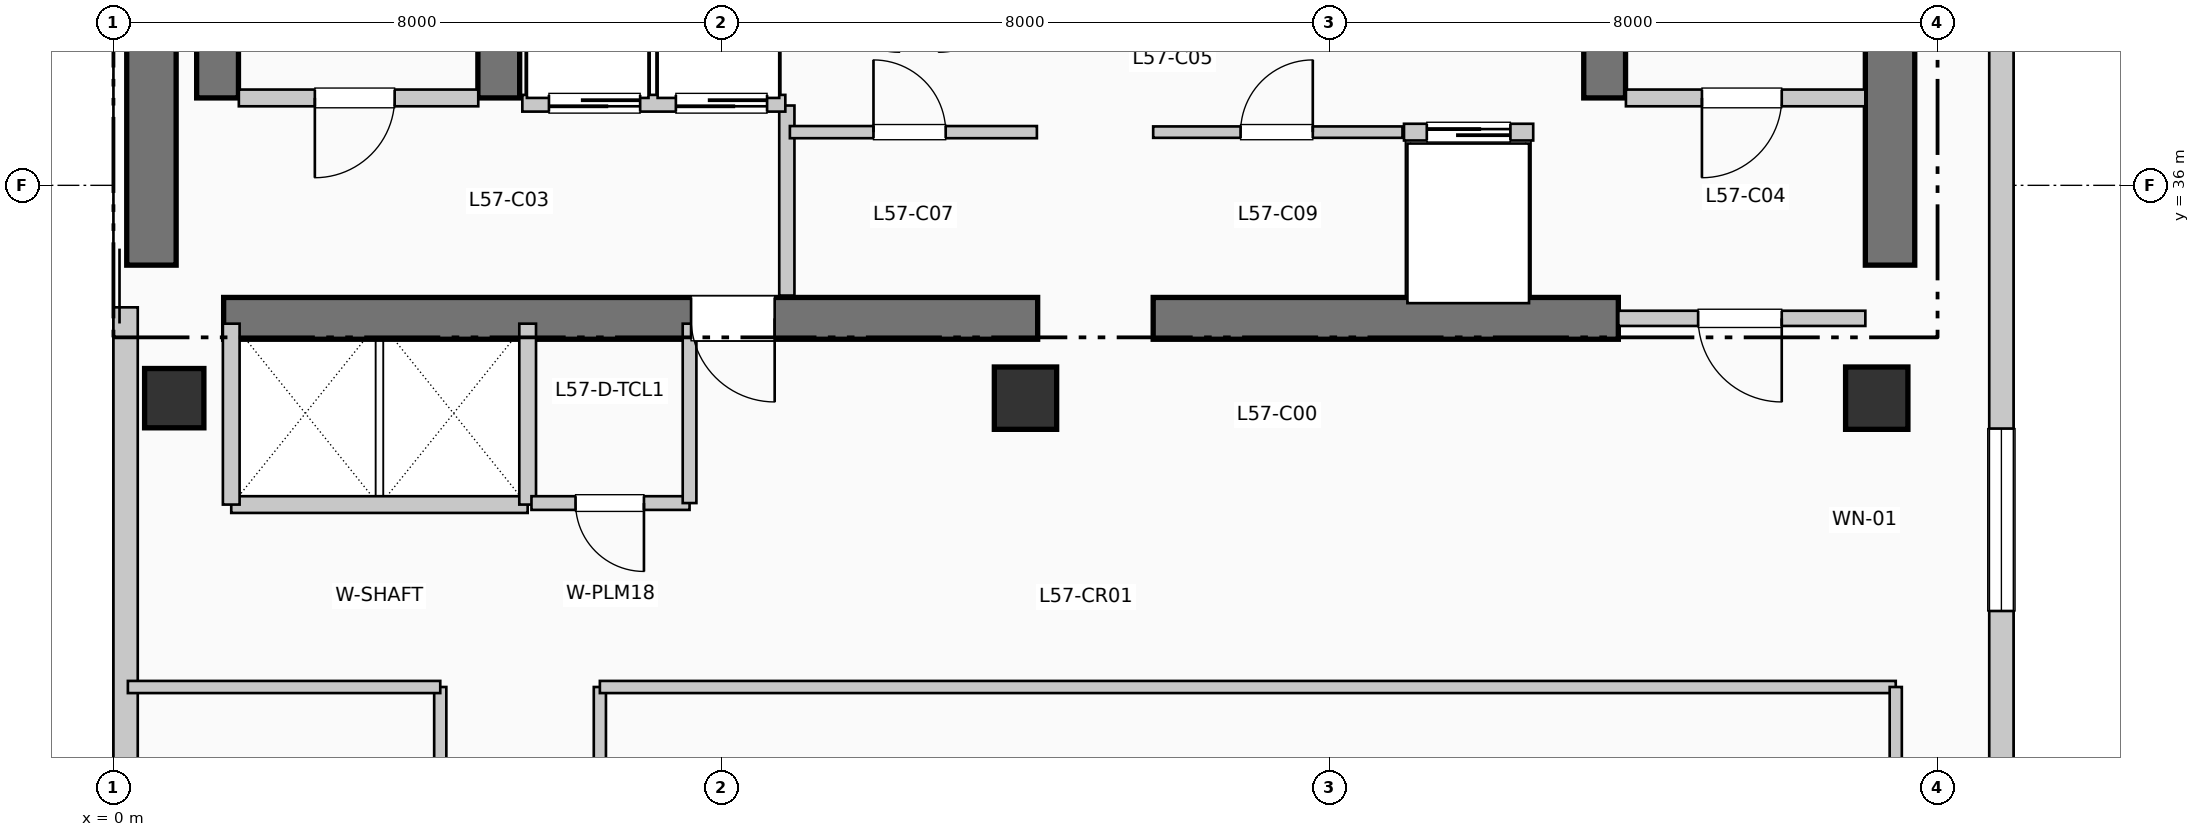
"""IFC4 building model, lengths in metres.
Left out: names, types, materials, properties, quantities, classifications, styles, units other than length and angle.
Written with IfcOpenShell. Run it as: python <this file> out.ifc"""

import sys

from ifc_helpers import new_model, si_unit, direction, frame, frame_2d, origin, origin_2d, place, context, subcontext, project, spatial, rectangle, extrude, element, fill, save


model = new_model("IFC4")
c1 = context("Model", 3, precision=1e-05, world=origin(), true_north=direction((0.0, 1.0)))
c2 = subcontext(c1, "Body", "Model", "MODEL_VIEW")
j1 = project(units=[si_unit("LENGTHUNIT", "METRE"), si_unit("PLANEANGLEUNIT", "RADIAN")], contexts=[c1])
p1 = place(None, origin())
s1 = spatial("IfcSite", under=j1, at=p1, CompositionType="ELEMENT")
p2 = place(p1, origin())
s2 = spatial("IfcBuilding", under=s1, at=p2, CompositionType="ELEMENT")
p3 = place(p2, frame((0.0, 0.0, 235.62)))
s3 = spatial("IfcBuildingStorey", under=s2, at=p3, CompositionType="ELEMENT", Elevation=235.62)
p4 = place(p3, frame((0.5, 34.95, 0.0), z_axis=(0.0, 0.0, 1.0), x_axis=(0.0, 1.0, 0.0)))
e1 = element("IfcWall", 1, at=p4, inside=s3, PredefinedType="SHEAR", context=c2, shape_type="SweptSolid", body=[
    extrude(rectangle(XDim=7.9, YDim=0.65, at=frame_2d((3.95, 0.0))), origin(), (0.0, 0.0, 1.0), 3.96),
])
p5 = place(p3, frame((23.375, 34.95, 0.0), z_axis=(0.0, 0.0, 1.0), x_axis=(0.0, 1.0, 0.0)))
e2 = element("IfcWall", 2, at=p5, inside=s3, PredefinedType="SHEAR", context=c2, shape_type="SweptSolid", body=[
    extrude(rectangle(XDim=10.64, YDim=0.65, at=frame_2d((5.32, 0.0))), origin(), (0.0, 0.0, 1.0), 3.96),
])
p6 = place(p3, frame((1.45, 34.25, 0.0), z_axis=(0.0, 0.0, 1.0), x_axis=(1.0, 0.0, 0.0)))
e3 = element("IfcWall", 3, at=p6, inside=s3, PredefinedType="SHEAR", context=c2, shape_type="SweptSolid", body=[
    extrude(rectangle(XDim=10.71, YDim=0.55, at=frame_2d((5.355, 0.0))), origin(), (0.0, 0.0, 1.0), 3.96),
])
p7 = place(p6, frame((7.25, 0.0, 0.0), z_axis=(0.0, 0.0, 1.0), x_axis=(-1.0, 0.0, 0.0)))
e4 = element("IfcOpeningElement", 4, at=p7, cuts=e3, PredefinedType="OPENING", context=c2, shape_type="SweptSolid", body=[
    extrude(rectangle(XDim=1.1, YDim=2.15, at=frame_2d((0.55, 1.075))), frame((0.0, 0.285, 0.0), z_axis=(0.0, -1.0, 0.0), x_axis=(1.0, 0.0, 0.0)), (0.0, 0.0, 1.0), 0.57),
])
p8 = place(p3, frame((13.68, 34.25, 0.0), z_axis=(0.0, 0.0, 1.0), x_axis=(1.0, 0.0, 0.0)))
e5 = element("IfcWall", 5, at=p8, inside=s3, PredefinedType="SHEAR", context=c2, shape_type="SweptSolid", body=[
    extrude(rectangle(XDim=6.12, YDim=0.55, at=frame_2d((3.06, 0.0))), origin(), (0.0, 0.0, 1.0), 3.96),
])
for number, where, z_axis, x_axis in (
    (6, (1.37, 37.15, 0.0), (0.0, 0.0, 1.0), (0.0, 1.0, 0.0)),
    (7, (5.07, 37.15, 0.0), (0.0, 0.0, 1.0), (0.0, 1.0, 0.0)),
    (8, (19.62, 37.15, 0.0), (0.0, 0.0, 1.0), (0.0, 1.0, 0.0)),
):
    element("IfcWall", number, at=place(p3, frame(where, z_axis=z_axis, x_axis=x_axis)), inside=s3, PredefinedType="SHEAR", context=c2, shape_type="SweptSolid", body=[
        extrude(rectangle(XDim=7.89, YDim=0.55, at=frame_2d((3.945, 0.0))), origin(), (0.0, 0.0, 1.0), 3.96),
    ])
p9 = place(p3, frame((0.8, 33.2, 0.0), z_axis=(0.0, 0.0, 1.0), x_axis=(1.0, 0.0, 0.0)))
e9 = element("IfcColumn", 9, at=p9, inside=s3, PredefinedType="COLUMN", context=c2, shape_type="SweptSolid", body=[
    extrude(rectangle(XDim=0.78, YDim=0.78, at=origin_2d()), origin(), (0.0, 0.0, 1.0), 3.96),
])
for number, where, z_axis, x_axis in (
    (10, (12.0, 33.2, 0.0), (0.0, 0.0, 1.0), (1.0, 0.0, 0.0)),
    (11, (23.2, 33.2, 0.0), (0.0, 0.0, 1.0), (1.0, 0.0, 0.0)),
):
    element("IfcColumn", number, at=place(p3, frame(where, z_axis=z_axis, x_axis=x_axis)), inside=s3, PredefinedType="COLUMN", context=c2, shape_type="SweptSolid", body=[
        extrude(rectangle(XDim=0.82, YDim=0.82, at=origin_2d()), origin(), (0.0, 0.0, 1.0), 3.96),
    ])
p10 = place(p3, frame((24.84, 22.055, 0.0), z_axis=(0.0, 0.0, 1.0), x_axis=(0.0, 1.0, 0.0)))
e12 = element("IfcWall", 12, at=p10, inside=s3, PredefinedType="SOLIDWALL", context=c2, shape_type="SweptSolid", body=[
    extrude(rectangle(XDim=19.09, YDim=0.32, at=frame_2d((9.545, 0.0))), origin(), (0.0, 0.0, 1.0), 3.71),
])
p11 = place(p10, frame((8.345, 0.0, 0.85)))
e13 = element("IfcOpeningElement", 13, at=p11, cuts=e12, PredefinedType="OPENING", context=c2, shape_type="SweptSolid", body=[
    extrude(rectangle(XDim=2.4, YDim=2.05, at=frame_2d((1.2, 1.025))), frame((0.0, 0.17, 0.0), z_axis=(0.0, -1.0, 0.0), x_axis=(1.0, 0.0, 0.0)), (0.0, 0.0, 1.0), 0.34),
])
p12 = place(p3, frame((0.16, 34.395, 0.0), z_axis=(0.0, 0.0, 1.0), x_axis=(0.0, -1.0, 0.0)))
e14 = element("IfcWall", 14, at=p12, inside=s3, PredefinedType="SOLIDWALL", context=c2, shape_type="SweptSolid", body=[
    extrude(rectangle(XDim=25.54, YDim=0.32, at=frame_2d((12.77, 0.0))), origin(), (0.0, 0.0, 1.0), 3.71),
])
p13 = place(p3, frame((1.65, 37.15, 0.0), z_axis=(0.0, 0.0, 1.0), x_axis=(1.0, 0.0, 0.0)))
e15 = element("IfcWall", 15, at=p13, inside=s3, PredefinedType="PARTITIONING", context=c2, shape_type="SweptSolid", body=[
    extrude(rectangle(XDim=3.15, YDim=0.22, at=frame_2d((1.575, 0.0))), origin(), (0.0, 0.0, 1.0), 3.71),
])
p14 = place(p13, frame((2.05, 0.0, 0.0), z_axis=(0.0, 0.0, 1.0), x_axis=(-1.0, 0.0, 0.0)))
e16 = element("IfcOpeningElement", 16, at=p14, cuts=e15, PredefinedType="OPENING", context=c2, shape_type="SweptSolid", body=[
    extrude(rectangle(XDim=1.05, YDim=2.15, at=frame_2d((0.525, 1.075))), frame((0.0, 0.12, 0.0), z_axis=(0.0, -1.0, 0.0), x_axis=(1.0, 0.0, 0.0)), (0.0, 0.0, 1.0), 0.24),
])
p15 = place(p3, frame((8.86, 34.55, 0.0), z_axis=(0.0, 0.0, 1.0), x_axis=(0.0, 1.0, 0.0)))
e17 = element("IfcWall", 17, at=p15, inside=s3, PredefinedType="PARTITIONING", context=c2, shape_type="SweptSolid", body=[
    extrude(rectangle(XDim=2.5, YDim=0.2, at=frame_2d((1.25, 0.0))), origin(), (0.0, 0.0, 1.0), 3.71),
])
p16 = place(p3, frame((19.9, 37.15, 0.0), z_axis=(0.0, 0.0, 1.0), x_axis=(1.0, 0.0, 0.0)))
e18 = element("IfcWall", 18, at=p16, inside=s3, PredefinedType="PARTITIONING", context=c2, shape_type="SweptSolid", body=[
    extrude(rectangle(XDim=3.15, YDim=0.22, at=frame_2d((1.575, 0.0))), origin(), (0.0, 0.0, 1.0), 3.71),
])
p17 = place(p16, frame((2.05, 0.0, 0.0), z_axis=(0.0, 0.0, 1.0), x_axis=(-1.0, 0.0, 0.0)))
e19 = element("IfcOpeningElement", 19, at=p17, cuts=e18, PredefinedType="OPENING", context=c2, shape_type="SweptSolid", body=[
    extrude(rectangle(XDim=1.05, YDim=2.15, at=frame_2d((0.525, 1.075))), frame((0.0, 0.12, 0.0), z_axis=(0.0, -1.0, 0.0), x_axis=(1.0, 0.0, 0.0)), (0.0, 0.0, 1.0), 0.24),
])
p18 = place(p3, frame((19.8, 34.25, 0.0), z_axis=(0.0, 0.0, 1.0), x_axis=(1.0, 0.0, 0.0)))
e20 = element("IfcWall", 20, at=p18, inside=s3, PredefinedType="PARTITIONING", context=c2, shape_type="SweptSolid", body=[
    extrude(rectangle(XDim=3.25, YDim=0.2, at=frame_2d((1.625, 0.0))), origin(), (0.0, 0.0, 1.0), 3.71),
])
p19 = place(p18, frame((2.15, 0.0, 0.0), z_axis=(0.0, 0.0, 1.0), x_axis=(-1.0, 0.0, 0.0)))
e21 = element("IfcOpeningElement", 21, at=p19, cuts=e20, PredefinedType="OPENING", context=c2, shape_type="SweptSolid", body=[
    extrude(rectangle(XDim=1.1, YDim=2.15, at=frame_2d((0.55, 1.075))), frame((0.0, 0.11, 0.0), z_axis=(0.0, -1.0, 0.0), x_axis=(1.0, 0.0, 0.0)), (0.0, 0.0, 1.0), 0.22),
])
p20 = place(p3, frame((5.38, 37.08, 0.0), z_axis=(0.0, 0.0, 1.0), x_axis=(1.0, 0.0, 0.0)))
e22 = element("IfcWall", 22, at=p20, inside=s3, PredefinedType="PARTITIONING", context=c2, shape_type="SweptSolid", body=[
    extrude(rectangle(XDim=3.46, YDim=0.22, at=frame_2d((1.73, 0.0))), origin(), (0.0, 0.0, 1.0), 3.71),
])
p21 = place(p20, frame((1.55, 0.0, 0.0), z_axis=(0.0, 0.0, 1.0), x_axis=(-1.0, 0.0, 0.0)))
e23 = element("IfcOpeningElement", 23, at=p21, cuts=e22, PredefinedType="OPENING", context=c2, shape_type="SweptSolid", body=[
    extrude(rectangle(XDim=1.2, YDim=2.2, at=frame_2d((0.6, 1.1))), frame((0.0, 0.12, 0.0), z_axis=(0.0, -1.0, 0.0), x_axis=(1.0, 0.0, 0.0)), (0.0, 0.0, 1.0), 0.24),
])
p22 = place(p20, frame((3.22, 0.0, 0.0), z_axis=(0.0, 0.0, 1.0), x_axis=(-1.0, 0.0, 0.0)))
e24 = element("IfcOpeningElement", 24, at=p22, cuts=e22, PredefinedType="OPENING", context=c2, shape_type="SweptSolid", body=[
    extrude(rectangle(XDim=1.2, YDim=2.2, at=frame_2d((0.6, 1.1))), frame((0.0, 0.12, 0.0), z_axis=(0.0, -1.0, 0.0), x_axis=(1.0, 0.0, 0.0)), (0.0, 0.0, 1.0), 0.24),
])
p23 = place(p3, frame((1.55, 31.8, 0.0), z_axis=(0.0, 0.0, 1.0), x_axis=(1.0, 0.0, 0.0)))
e25 = element("IfcWall", 25, at=p23, inside=s3, PredefinedType="PARTITIONING", context=c2, shape_type="SweptSolid", body=[
    extrude(rectangle(XDim=3.9, YDim=0.22, at=frame_2d((1.95, 0.0))), origin(), (0.0, 0.0, 1.0), 3.71),
])
for number, where, z_axis, x_axis in (
    (26, (1.55, 31.8, 0.0), (0.0, 0.0, 1.0), (0.0, 1.0, 0.0)),
    (27, (5.45, 31.8, 0.0), (0.0, 0.0, 1.0), (0.0, 1.0, 0.0)),
):
    element("IfcWall", number, at=place(p3, frame(where, z_axis=z_axis, x_axis=x_axis)), inside=s3, PredefinedType="PARTITIONING", context=c2, shape_type="SweptSolid", body=[
        extrude(rectangle(XDim=2.38, YDim=0.22, at=frame_2d((1.19, 0.0))), origin(), (0.0, 0.0, 1.0), 3.71),
    ])
p24 = place(p3, frame((5.5, 31.82, 0.0), z_axis=(0.0, 0.0, 1.0), x_axis=(1.0, 0.0, 0.0)))
e28 = element("IfcWall", 28, at=p24, inside=s3, PredefinedType="PLUMBINGWALL", context=c2, shape_type="SweptSolid", body=[
    extrude(rectangle(XDim=2.08, YDim=0.18, at=frame_2d((1.04, 0.0))), origin(), (0.0, 0.0, 1.0), 3.71),
])
p25 = place(p24, frame((1.48, 0.0, 0.0), z_axis=(0.0, 0.0, 1.0), x_axis=(-1.0, 0.0, 0.0)))
e29 = element("IfcOpeningElement", 29, at=p25, cuts=e28, PredefinedType="OPENING", context=c2, shape_type="SweptSolid", body=[
    extrude(rectangle(XDim=0.9, YDim=2.1, at=frame_2d((0.45, 1.05))), frame((0.0, 0.1, 0.0), z_axis=(0.0, -1.0, 0.0), x_axis=(1.0, 0.0, 0.0)), (0.0, 0.0, 1.0), 0.2),
])
p26 = place(p3, frame((7.58, 31.82, 0.0), z_axis=(0.0, 0.0, 1.0), x_axis=(0.0, 1.0, 0.0)))
e30 = element("IfcWall", 30, at=p26, inside=s3, PredefinedType="PLUMBINGWALL", context=c2, shape_type="SweptSolid", body=[
    extrude(rectangle(XDim=2.36, YDim=0.18, at=frame_2d((1.18, 0.0))), origin(), (0.0, 0.0, 1.0), 3.71),
])
p27 = place(p3, frame((8.9, 36.7, 0.0), z_axis=(0.0, 0.0, 1.0), x_axis=(1.0, 0.0, 0.0)))
e31 = element("IfcWall", 31, at=p27, inside=s3, PredefinedType="PARTITIONING", context=c2, shape_type="SweptSolid", body=[
    extrude(rectangle(XDim=3.25, YDim=0.16, at=frame_2d((1.625, 0.0))), origin(), (0.0, 0.0, 1.0), 3.71),
])
p28 = place(p27, frame((1.1, 0.0, 0.0)))
e32 = element("IfcOpeningElement", 32, at=p28, cuts=e31, PredefinedType="OPENING", context=c2, shape_type="SweptSolid", body=[
    extrude(rectangle(XDim=0.95, YDim=2.15, at=frame_2d((0.475, 1.075))), frame((0.0, 0.09, 0.0), z_axis=(0.0, -1.0, 0.0), x_axis=(1.0, 0.0, 0.0)), (0.0, 0.0, 1.0), 0.18),
])
p29 = place(p3, frame((13.68, 36.7, 0.0), z_axis=(0.0, 0.0, 1.0), x_axis=(1.0, 0.0, 0.0)))
e33 = element("IfcWall", 33, at=p29, inside=s3, PredefinedType="PARTITIONING", context=c2, shape_type="SweptSolid", body=[
    extrude(rectangle(XDim=3.28, YDim=0.15, at=frame_2d((1.64, 0.0))), origin(), (0.0, 0.0, 1.0), 3.71),
])
p30 = place(p29, frame((1.15, 0.0, 0.0)))
e34 = element("IfcOpeningElement", 34, at=p30, cuts=e33, PredefinedType="OPENING", context=c2, shape_type="SweptSolid", body=[
    extrude(rectangle(XDim=0.95, YDim=2.15, at=frame_2d((0.475, 1.075))), frame((0.0, 0.085, 0.0), z_axis=(0.0, -1.0, 0.0), x_axis=(1.0, 0.0, 0.0)), (0.0, 0.0, 1.0), 0.17),
])
p31 = place(p3, frame((16.98, 36.7, 0.0), z_axis=(0.0, 0.0, 1.0), x_axis=(1.0, 0.0, 0.0)))
e35 = element("IfcWall", 35, at=p31, inside=s3, PredefinedType="PARTITIONING", context=c2, shape_type="SweptSolid", body=[
    extrude(rectangle(XDim=1.7, YDim=0.22, at=frame_2d((0.85, 0.0))), origin(), (0.0, 0.0, 1.0), 3.71),
])
p32 = place(p31, frame((0.3, 0.0, 0.0)))
e36 = element("IfcOpeningElement", 36, at=p32, cuts=e35, PredefinedType="OPENING", context=c2, shape_type="SweptSolid", body=[
    extrude(rectangle(XDim=1.1, YDim=2.2, at=frame_2d((0.55, 1.1))), frame((0.0, 0.12, 0.0), z_axis=(0.0, -1.0, 0.0), x_axis=(1.0, 0.0, 0.0)), (0.0, 0.0, 1.0), 0.24),
])
p33 = place(p3, frame((4.3, 10.6, 0.0), z_axis=(0.0, 0.0, 1.0), x_axis=(0.0, 1.0, 0.0)))
e37 = element("IfcWall", 37, at=p33, inside=s3, PredefinedType="PARTITIONING", context=c2, shape_type="SweptSolid", body=[
    extrude(rectangle(XDim=18.8, YDim=0.16, at=frame_2d((9.4, 0.0))), origin(), (0.0, 0.0, 1.0), 3.71),
])
p34 = place(p33, frame((4.987, 0.0, 0.0), z_axis=(0.0, 0.0, 1.0), x_axis=(-1.0, 0.0, 0.0)))
e38 = element("IfcOpeningElement", 38, at=p34, cuts=e37, PredefinedType="OPENING", context=c2, shape_type="SweptSolid", body=[
    extrude(rectangle(XDim=0.95, YDim=2.15, at=frame_2d((0.475, 1.075))), frame((0.0, 0.09, 0.0), z_axis=(0.0, -1.0, 0.0), x_axis=(1.0, 0.0, 0.0)), (0.0, 0.0, 1.0), 0.18),
])
p35 = place(p33, frame((14.387, 0.0, 0.0), z_axis=(0.0, 0.0, 1.0), x_axis=(-1.0, 0.0, 0.0)))
e39 = element("IfcOpeningElement", 39, at=p35, cuts=e37, PredefinedType="OPENING", context=c2, shape_type="SweptSolid", body=[
    extrude(rectangle(XDim=0.95, YDim=2.15, at=frame_2d((0.475, 1.075))), frame((0.0, 0.09, 0.0), z_axis=(0.0, -1.0, 0.0), x_axis=(1.0, 0.0, 0.0)), (0.0, 0.0, 1.0), 0.18),
])
p36 = place(p3, frame((6.4, 10.6, 0.0), z_axis=(0.0, 0.0, 1.0), x_axis=(0.0, 1.0, 0.0)))
e40 = element("IfcWall", 40, at=p36, inside=s3, PredefinedType="PARTITIONING", context=c2, shape_type="SweptSolid", body=[
    extrude(rectangle(XDim=18.8, YDim=0.16, at=frame_2d((9.4, 0.0))), origin(), (0.0, 0.0, 1.0), 3.71),
])
p37 = place(p36, frame((1.593, 0.0, 0.0)))
e41 = element("IfcOpeningElement", 41, at=p37, cuts=e40, PredefinedType="OPENING", context=c2, shape_type="SweptSolid", body=[
    extrude(rectangle(XDim=0.95, YDim=2.15, at=frame_2d((0.475, 1.075))), frame((0.0, 0.09, 0.0), z_axis=(0.0, -1.0, 0.0), x_axis=(1.0, 0.0, 0.0)), (0.0, 0.0, 1.0), 0.18),
])
p38 = place(p36, frame((6.105, 0.0, 0.0)))
e42 = element("IfcOpeningElement", 42, at=p38, cuts=e40, PredefinedType="OPENING", context=c2, shape_type="SweptSolid", body=[
    extrude(rectangle(XDim=0.95, YDim=2.15, at=frame_2d((0.475, 1.075))), frame((0.0, 0.09, 0.0), z_axis=(0.0, -1.0, 0.0), x_axis=(1.0, 0.0, 0.0)), (0.0, 0.0, 1.0), 0.18),
])
p39 = place(p36, frame((10.993, 0.0, 0.0)))
e43 = element("IfcOpeningElement", 43, at=p39, cuts=e40, PredefinedType="OPENING", context=c2, shape_type="SweptSolid", body=[
    extrude(rectangle(XDim=0.95, YDim=2.15, at=frame_2d((0.475, 1.075))), frame((0.0, 0.09, 0.0), z_axis=(0.0, -1.0, 0.0), x_axis=(1.0, 0.0, 0.0)), (0.0, 0.0, 1.0), 0.18),
])
p40 = place(p36, frame((15.881, 0.0, 0.0)))
e44 = element("IfcOpeningElement", 44, at=p40, cuts=e40, PredefinedType="OPENING", context=c2, shape_type="SweptSolid", body=[
    extrude(rectangle(XDim=0.95, YDim=2.15, at=frame_2d((0.475, 1.075))), frame((0.0, 0.09, 0.0), z_axis=(0.0, -1.0, 0.0), x_axis=(1.0, 0.0, 0.0)), (0.0, 0.0, 1.0), 0.18),
])
p41 = place(p3, frame((0.19, 29.4, 0.0), z_axis=(0.0, 0.0, 1.0), x_axis=(1.0, 0.0, 0.0)))
e45 = element("IfcWall", 45, at=p41, inside=s3, PredefinedType="PARTITIONING", context=c2, shape_type="SweptSolid", body=[
    extrude(rectangle(XDim=4.11, YDim=0.16, at=frame_2d((2.055, 0.0))), origin(), (0.0, 0.0, 1.0), 3.365),
])
p42 = place(p3, frame((6.4, 29.4, 0.0), z_axis=(0.0, 0.0, 1.0), x_axis=(1.0, 0.0, 0.0)))
e46 = element("IfcWall", 46, at=p42, inside=s3, PredefinedType="PARTITIONING", context=c2, shape_type="SweptSolid", body=[
    extrude(rectangle(XDim=17.05, YDim=0.16, at=frame_2d((8.525, 0.0))), origin(), (0.0, 0.0, 1.0), 3.365),
])
p43 = place(p3, frame((23.45, 5.99, 0.0), z_axis=(0.0, 0.0, 1.0), x_axis=(0.0, 1.0, 0.0)))
e47 = element("IfcWall", 47, at=p43, inside=s3, PredefinedType="PARTITIONING", context=c2, shape_type="SweptSolid", body=[
    extrude(rectangle(XDim=23.41, YDim=0.16, at=frame_2d((11.705, 0.0))), origin(), (0.0, 0.0, 1.0), 3.095),
])
p44 = place(p11, origin())
e48 = element("IfcWindow", 48, at=p44, inside=s3, PartitioningType="SINGLE_PANEL", PredefinedType="WINDOW", context=c2, shape_type="SweptSolid", body=[
    extrude(rectangle(XDim=2.4, YDim=2.05, at=frame_2d((1.2, 1.025))), frame((0.0, 0.03, 0.0), z_axis=(0.0, -1.0, 0.0), x_axis=(1.0, 0.0, 0.0)), (0.0, 0.0, 1.0), 0.06),
])
fill(e13, e48)
p45 = place(p14, origin())
e49 = element("IfcDoor", 49, at=p45, inside=s3, OperationType="SINGLE_SWING_LEFT", PredefinedType="DOOR", context=c2, shape_type="SweptSolid", body=[
    extrude(rectangle(XDim=1.05, YDim=2.15, at=frame_2d((0.525, 1.075))), frame((0.0, 0.025, 0.0), z_axis=(0.0, -1.0, 0.0), x_axis=(1.0, 0.0, 0.0)), (0.0, 0.0, 1.0), 0.05),
])
fill(e16, e49)
p46 = place(p7, origin())
e50 = element("IfcDoor", 50, at=p46, inside=s3, OperationType="SINGLE_SWING_RIGHT", PredefinedType="DOOR", context=c2, shape_type="SweptSolid", body=[
    extrude(rectangle(XDim=1.1, YDim=2.15, at=frame_2d((0.55, 1.075))), frame((0.0, 0.025, 0.0), z_axis=(0.0, -1.0, 0.0), x_axis=(1.0, 0.0, 0.0)), (0.0, 0.0, 1.0), 0.05),
])
fill(e4, e50)
p47 = place(p17, origin())
e51 = element("IfcDoor", 51, at=p47, inside=s3, OperationType="SINGLE_SWING_LEFT", PredefinedType="DOOR", context=c2, shape_type="SweptSolid", body=[
    extrude(rectangle(XDim=1.05, YDim=2.15, at=frame_2d((0.525, 1.075))), frame((0.0, 0.025, 0.0), z_axis=(0.0, -1.0, 0.0), x_axis=(1.0, 0.0, 0.0)), (0.0, 0.0, 1.0), 0.05),
])
fill(e19, e51)
p48 = place(p19, origin())
e52 = element("IfcDoor", 52, at=p48, inside=s3, OperationType="SINGLE_SWING_RIGHT", PredefinedType="DOOR", context=c2, shape_type="SweptSolid", body=[
    extrude(rectangle(XDim=1.1, YDim=2.15, at=frame_2d((0.55, 1.075))), frame((0.0, 0.025, 0.0), z_axis=(0.0, -1.0, 0.0), x_axis=(1.0, 0.0, 0.0)), (0.0, 0.0, 1.0), 0.05),
])
fill(e21, e52)
p49 = place(p21, origin())
e53 = element("IfcDoor", 53, at=p49, inside=s3, OperationType="SLIDING_TO_RIGHT", PredefinedType="DOOR", context=c2, shape_type="SweptSolid", body=[
    extrude(rectangle(XDim=1.2, YDim=2.2, at=frame_2d((0.6, 1.1))), frame((0.0, 0.025, 0.0), z_axis=(0.0, -1.0, 0.0), x_axis=(1.0, 0.0, 0.0)), (0.0, 0.0, 1.0), 0.05),
])
fill(e23, e53)
p50 = place(p22, origin())
e54 = element("IfcDoor", 54, at=p50, inside=s3, OperationType="SLIDING_TO_RIGHT", PredefinedType="DOOR", context=c2, shape_type="SweptSolid", body=[
    extrude(rectangle(XDim=1.2, YDim=2.2, at=frame_2d((0.6, 1.1))), frame((0.0, 0.025, 0.0), z_axis=(0.0, -1.0, 0.0), x_axis=(1.0, 0.0, 0.0)), (0.0, 0.0, 1.0), 0.05),
])
fill(e24, e54)
p51 = place(p25, origin())
e55 = element("IfcDoor", 55, at=p51, inside=s3, OperationType="SINGLE_SWING_RIGHT", PredefinedType="DOOR", context=c2, shape_type="SweptSolid", body=[
    extrude(rectangle(XDim=0.9, YDim=2.1, at=frame_2d((0.45, 1.05))), frame((0.0, 0.025, 0.0), z_axis=(0.0, -1.0, 0.0), x_axis=(1.0, 0.0, 0.0)), (0.0, 0.0, 1.0), 0.05),
])
fill(e29, e55)
p52 = place(p28, origin())
e56 = element("IfcDoor", 56, at=p52, inside=s3, OperationType="SINGLE_SWING_LEFT", PredefinedType="DOOR", context=c2, shape_type="SweptSolid", body=[
    extrude(rectangle(XDim=0.95, YDim=2.15, at=frame_2d((0.475, 1.075))), frame((0.0, 0.025, 0.0), z_axis=(0.0, -1.0, 0.0), x_axis=(1.0, 0.0, 0.0)), (0.0, 0.0, 1.0), 0.05),
])
fill(e32, e56)
p53 = place(p30, origin())
e57 = element("IfcDoor", 57, at=p53, inside=s3, OperationType="SINGLE_SWING_RIGHT", PredefinedType="DOOR", context=c2, shape_type="SweptSolid", body=[
    extrude(rectangle(XDim=0.95, YDim=2.15, at=frame_2d((0.475, 1.075))), frame((0.0, 0.025, 0.0), z_axis=(0.0, -1.0, 0.0), x_axis=(1.0, 0.0, 0.0)), (0.0, 0.0, 1.0), 0.05),
])
fill(e34, e57)
p54 = place(p32, origin())
e58 = element("IfcDoor", 58, at=p54, inside=s3, OperationType="SLIDING_TO_LEFT", PredefinedType="DOOR", context=c2, shape_type="SweptSolid", body=[
    extrude(rectangle(XDim=1.1, YDim=2.2, at=frame_2d((0.55, 1.1))), frame((0.0, 0.025, 0.0), z_axis=(0.0, -1.0, 0.0), x_axis=(1.0, 0.0, 0.0)), (0.0, 0.0, 1.0), 0.05),
])
fill(e36, e58)
save(model, sys.argv[1])
